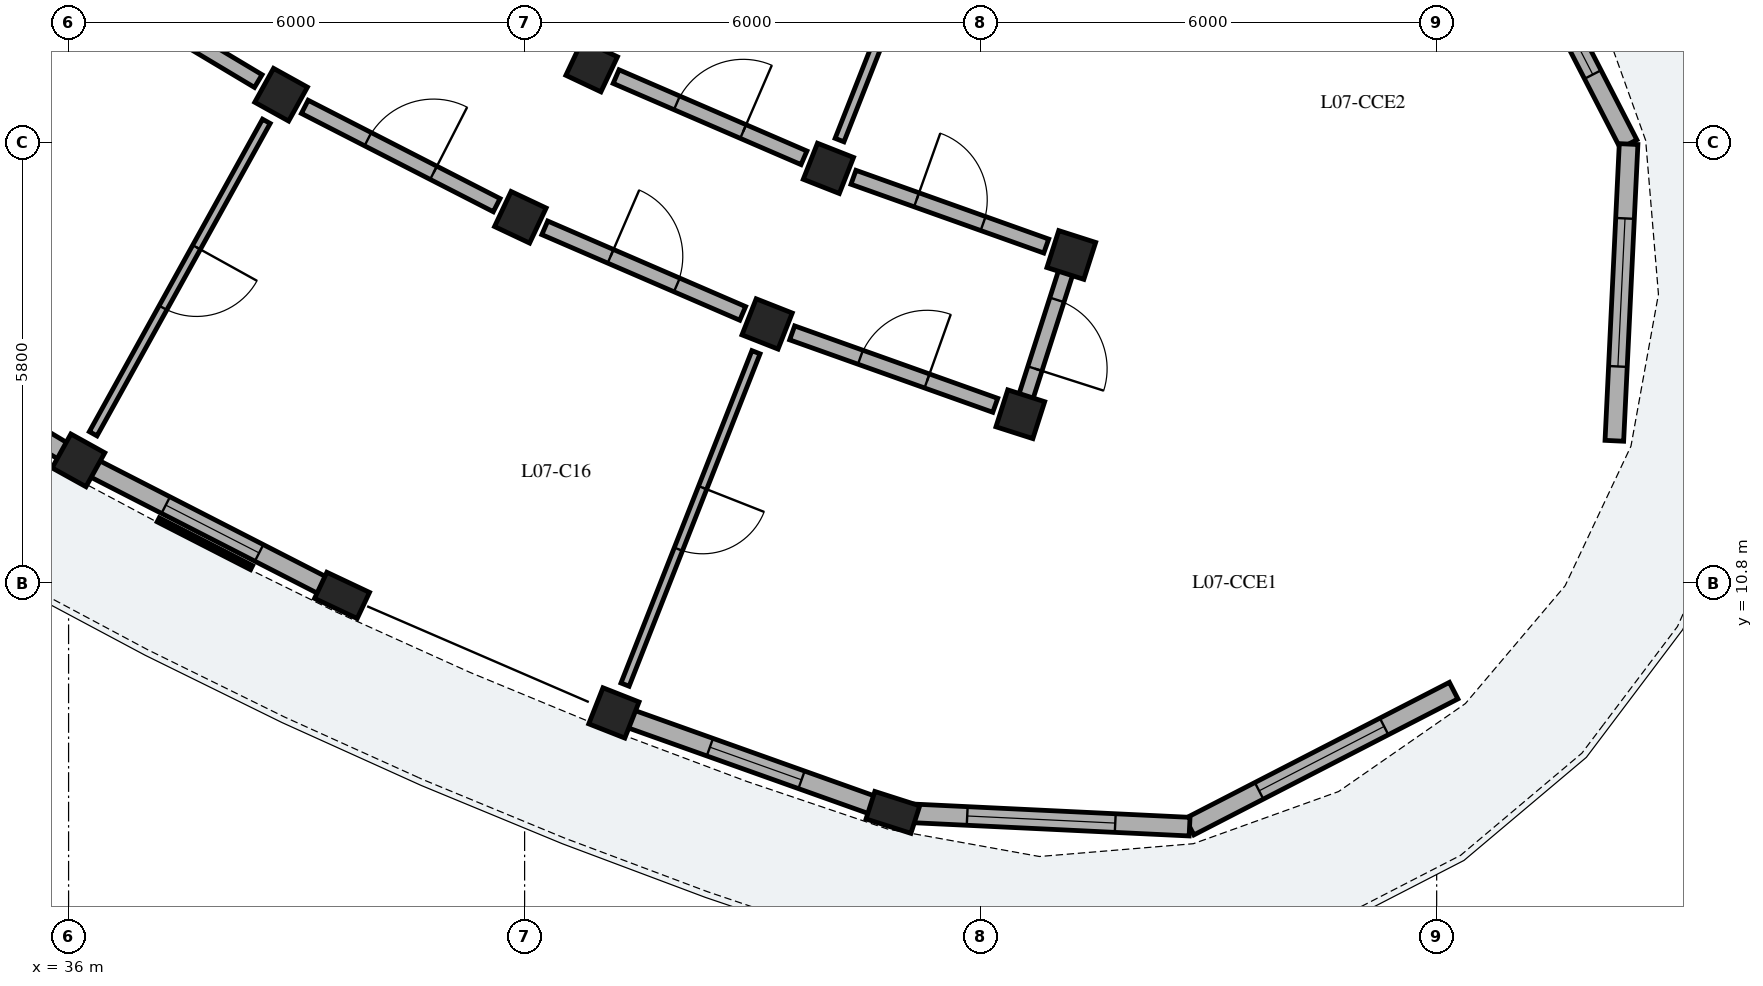
"""IFC4 building model, lengths in metres.
Left out: names, types, materials, properties, quantities, classifications, styles, units other than length and angle.
Written with IfcOpenShell. Run it as: python <this file> out.ifc"""

import sys

from ifc_helpers import new_model, si_unit, direction, frame, frame_2d, origin, origin_2d, place, context, subcontext, project, spatial, rectangle, extrude, element, fill, save


model = new_model("IFC4")
c1 = context("Model", 3, precision=1e-05, world=origin(), true_north=direction((0.0, 1.0)))
c2 = subcontext(c1, "Body", "Model", "MODEL_VIEW")
j1 = project(units=[si_unit("LENGTHUNIT", "METRE"), si_unit("PLANEANGLEUNIT", "RADIAN")], contexts=[c1])
p1 = place(None, origin())
s1 = spatial("IfcSite", under=j1, at=p1, CompositionType="ELEMENT")
p2 = place(p1, origin())
s2 = spatial("IfcBuilding", under=s1, at=p2, CompositionType="ELEMENT")
p3 = place(p2, frame((0.0, 0.0, 25.64)))
s3 = spatial("IfcBuildingStorey", under=s2, at=p3, CompositionType="ELEMENT", Elevation=25.64)
for number, where, z_axis, x_axis in (
    (1, (38.796, 17.227, 0.0), (0.0, 0.0, 1.0), (-0.485, -0.875, 0.0)),
    (2, (36.13, 12.417, 0.0), (0.0, 0.0, 1.0), (-0.485, -0.875, 0.0)),
    (3, (42.882, 17.604, 0.0), (0.0, 0.0, 1.0), (-0.427, -0.904, 0.0)),
    (4, (41.944, 15.614, 0.0), (0.0, 0.0, 1.0), (-0.427, -0.904, 0.0)),
):
    element("IfcColumn", number, at=place(p3, frame(where, z_axis=z_axis, x_axis=x_axis)), inside=s3, PredefinedType="COLUMN", context=c2, shape_type="SweptSolid", body=[
        extrude(rectangle(XDim=0.51, YDim=0.51, at=origin_2d()), origin(), (0.0, 0.0, 1.0), 3.11),
    ])
p4 = place(p3, frame((39.598, 10.64, 0.0), z_axis=(0.0, 0.0, 1.0), x_axis=(-0.426568739901, -0.904455145454, 0.0)))
e5 = element("IfcColumn", 5, at=p4, inside=s3, PredefinedType="PILASTER", context=c2, shape_type="SweptSolid", body=[
    extrude(rectangle(XDim=0.38, YDim=0.62, at=origin_2d()), origin(), (0.0, 0.0, 1.0), 3.11),
])
for number, where, z_axis, x_axis in (
    (6, (45.997, 16.258, 0.0), (0.0, 0.0, 1.0), (-0.367, -0.93, 0.0)),
    (7, (45.191, 14.211, 0.0), (0.0, 0.0, 1.0), (-0.367, -0.93, 0.0)),
    (8, (43.175, 9.094, 0.0), (0.0, 0.0, 1.0), (-0.367, -0.93, 0.0)),
    (9, (49.193, 15.118, 0.0), (0.0, 0.0, 1.0), (-0.305, -0.952, 0.0)),
    (10, (48.522, 13.023, 0.0), (0.0, 0.0, 1.0), (-0.305, -0.952, 0.0)),
):
    element("IfcColumn", number, at=place(p3, frame(where, z_axis=z_axis, x_axis=x_axis)), inside=s3, PredefinedType="COLUMN", context=c2, shape_type="SweptSolid", body=[
        extrude(rectangle(XDim=0.51, YDim=0.51, at=origin_2d()), origin(), (0.0, 0.0, 1.0), 3.11),
    ])
p5 = place(p3, frame((46.845, 7.785, 0.0), z_axis=(0.0, 0.0, 1.0), x_axis=(-0.304864299028, -0.952395799643, 0.0)))
e11 = element("IfcColumn", 11, at=p5, inside=s3, PredefinedType="PILASTER", context=c2, shape_type="SweptSolid", body=[
    extrude(rectangle(XDim=0.38, YDim=0.62, at=origin_2d()), origin(), (0.0, 0.0, 1.0), 3.11),
])
p6 = place(p3, frame((32.922, 14.334, 0.0), z_axis=(0.0, 0.0, 1.0), x_axis=(0.858277078874, -0.513186570245, 0.0)))
e12 = element("IfcWall", 12, at=p6, inside=s3, PredefinedType="SOLIDWALL", context=c2, shape_type="SweptSolid", body=[
    extrude(rectangle(XDim=3.512, YDim=0.245, at=frame_2d((1.756, 0.0))), origin(), (0.0, 0.0, 1.0), 2.355),
])
p7 = place(p6, frame((1.246, 0.0, 0.0)))
e13 = element("IfcOpeningElement", 13, at=p7, cuts=e12, PredefinedType="OPENING", context=c2, shape_type="SweptSolid", body=[
    extrude(rectangle(XDim=1.02, YDim=2.14, at=frame_2d((0.51, 1.07))), frame((0.0, 0.133, 0.0), z_axis=(0.0, -1.0, 0.0), x_axis=(1.0, 0.0, 0.0)), (0.0, 0.0, 1.0), 0.265),
])
p8 = place(p3, frame((36.33, 12.314, 0.0), z_axis=(0.0, 0.0, 1.0), x_axis=(0.890018595161, -0.455924226454, 0.0)))
e14 = element("IfcWall", 14, at=p8, inside=s3, PredefinedType="SOLIDWALL", context=c2, shape_type="SweptSolid", body=[
    extrude(rectangle(XDim=3.512, YDim=0.245, at=frame_2d((1.756, 0.0))), origin(), (0.0, 0.0, 1.0), 2.355),
])
p9 = place(p8, frame((1.066, 0.0, 0.55)))
e15 = element("IfcOpeningElement", 15, at=p9, cuts=e14, PredefinedType="OPENING", context=c2, shape_type="SweptSolid", body=[
    extrude(rectangle(XDim=1.38, YDim=1.56, at=frame_2d((0.69, 0.78))), frame((0.0, 0.133, 0.0), z_axis=(0.0, -1.0, 0.0), x_axis=(1.0, 0.0, 0.0)), (0.0, 0.0, 1.0), 0.265),
])
p10 = place(p3, frame((43.387, 9.018, 0.0), z_axis=(0.0, 0.0, 1.0), x_axis=(0.941916369274, -0.335847514943, 0.0)))
e16 = element("IfcWall", 16, at=p10, inside=s3, PredefinedType="SOLIDWALL", context=c2, shape_type="SweptSolid", body=[
    extrude(rectangle(XDim=3.512, YDim=0.245, at=frame_2d((1.756, 0.0))), origin(), (0.0, 0.0, 1.0), 2.355),
])
p11 = place(p10, frame((1.116, 0.0, 0.55)))
e17 = element("IfcOpeningElement", 17, at=p11, cuts=e16, PredefinedType="OPENING", context=c2, shape_type="SweptSolid", body=[
    extrude(rectangle(XDim=1.28, YDim=1.56, at=frame_2d((0.64, 0.78))), frame((0.0, 0.133, 0.0), z_axis=(0.0, -1.0, 0.0), x_axis=(1.0, 0.0, 0.0)), (0.0, 0.0, 1.0), 0.265),
])
p12 = place(p3, frame((54.736, 20.052, 0.0), z_axis=(0.0, 0.0, 1.0), x_axis=(0.457901236663, -0.889003069434, 0.0)))
e18 = element("IfcWall", 18, at=p12, inside=s3, PredefinedType="SOLIDWALL", context=c2, shape_type="SweptSolid", body=[
    extrude(rectangle(XDim=3.908, YDim=0.245, at=frame_2d((1.954, 0.0))), origin(), (0.0, 0.0, 1.0), 2.355),
])
p13 = place(p12, frame((1.029, 0.0, 0.4)))
e19 = element("IfcOpeningElement", 19, at=p13, cuts=e18, PredefinedType="OPENING", context=c2, shape_type="SweptSolid", body=[
    extrude(rectangle(XDim=1.85, YDim=1.72, at=frame_2d((0.925, 0.86))), frame((0.0, 0.133, 0.0), z_axis=(0.0, -1.0, 0.0), x_axis=(1.0, 0.0, 0.0)), (0.0, 0.0, 1.0), 0.265),
])
p14 = place(p3, frame((56.525, 16.577, 0.0), z_axis=(0.0, 0.0, 1.0), x_axis=(-0.047974714619, -0.998848550461, 0.0)))
e20 = element("IfcWall", 20, at=p14, inside=s3, PredefinedType="SOLIDWALL", context=c2, shape_type="SweptSolid", body=[
    extrude(rectangle(XDim=3.908, YDim=0.245, at=frame_2d((1.954, 0.0))), origin(), (0.0, 0.0, 1.0), 2.355),
])
p15 = place(p14, frame((0.979, 0.0, 0.4)))
e21 = element("IfcOpeningElement", 21, at=p15, cuts=e20, PredefinedType="OPENING", context=c2, shape_type="SweptSolid", body=[
    extrude(rectangle(XDim=1.95, YDim=1.78, at=frame_2d((0.975, 0.89))), frame((0.0, 0.133, 0.0), z_axis=(0.0, -1.0, 0.0), x_axis=(1.0, 0.0, 0.0)), (0.0, 0.0, 1.0), 0.265),
])
p16 = place(p3, frame((54.223, 9.387, 0.0), z_axis=(0.0, 0.0, 1.0), x_axis=(-0.889028498589, -0.457851863267, 0.0)))
e22 = element("IfcWall", 22, at=p16, inside=s3, PredefinedType="SOLIDWALL", context=c2, shape_type="SweptSolid", body=[
    extrude(rectangle(XDim=3.908, YDim=0.245, at=frame_2d((1.954, 0.0))), origin(), (0.0, 0.0, 1.0), 2.355),
])
p17 = place(p16, frame((1.029, 0.0, 0.4)))
e23 = element("IfcOpeningElement", 23, at=p17, cuts=e22, PredefinedType="OPENING", context=c2, shape_type="SweptSolid", body=[
    extrude(rectangle(XDim=1.85, YDim=1.72, at=frame_2d((0.925, 0.86))), frame((0.0, 0.133, 0.0), z_axis=(0.0, -1.0, 0.0), x_axis=(1.0, 0.0, 0.0)), (0.0, 0.0, 1.0), 0.265),
])
p18 = place(p3, frame((50.749, 7.597, 0.0), z_axis=(0.0, 0.0, 1.0), x_axis=(-0.998848550461, 0.047974714619, 0.0)))
e24 = element("IfcWall", 24, at=p18, inside=s3, PredefinedType="SOLIDWALL", context=c2, shape_type="SweptSolid", body=[
    extrude(rectangle(XDim=3.908, YDim=0.245, at=frame_2d((1.954, 0.0))), origin(), (0.0, 0.0, 1.0), 2.355),
])
p19 = place(p18, frame((0.979, 0.0, 0.4)))
e25 = element("IfcOpeningElement", 25, at=p19, cuts=e24, PredefinedType="OPENING", context=c2, shape_type="SweptSolid", body=[
    extrude(rectangle(XDim=1.95, YDim=1.78, at=frame_2d((0.975, 0.89))), frame((0.0, 0.133, 0.0), z_axis=(0.0, -1.0, 0.0), x_axis=(1.0, 0.0, 0.0)), (0.0, 0.0, 1.0), 0.265),
])
p20 = place(p3, frame((36.061, 18.862, 0.0), z_axis=(0.0, 0.0, 1.0), x_axis=(0.858281647443, -0.51317892948, 0.0)))
e26 = element("IfcWall", 26, at=p20, inside=s3, PredefinedType="PARTITIONING", context=c2, shape_type="SweptSolid", body=[
    extrude(rectangle(XDim=2.837, YDim=0.195, at=frame_2d((1.418, 0.0))), origin(), (0.0, 0.0, 1.0), 2.37),
])
p21 = place(p20, frame((0.924, 0.0, 0.0)))
e27 = element("IfcOpeningElement", 27, at=p21, cuts=e26, PredefinedType="OPENING", context=c2, shape_type="SweptSolid", body=[
    extrude(rectangle(XDim=0.99, YDim=2.16, at=frame_2d((0.495, 1.08))), frame((0.0, 0.107, 0.0), z_axis=(0.0, -1.0, 0.0), x_axis=(1.0, 0.0, 0.0)), (0.0, 0.0, 1.0), 0.215),
])
p22 = place(p3, frame((38.602, 16.877, 0.0), z_axis=(0.0, 0.0, 1.0), x_axis=(-0.484813534336, -0.874617537513, 0.0)))
e28 = element("IfcWall", 28, at=p22, inside=s3, PredefinedType="PARTITIONING", context=c2, shape_type="SweptSolid", body=[
    extrude(rectangle(XDim=4.7, YDim=0.115, at=frame_2d((2.35, 0.0))), origin(), (0.0, 0.0, 1.0), 2.37),
])
p23 = place(p22, frame((1.895, 0.0, 0.0)))
e29 = element("IfcOpeningElement", 29, at=p23, cuts=e28, PredefinedType="OPENING", context=c2, shape_type="SweptSolid", body=[
    extrude(rectangle(XDim=0.91, YDim=2.1, at=frame_2d((0.455, 1.05))), frame((0.0, 0.067, 0.0), z_axis=(0.0, -1.0, 0.0), x_axis=(1.0, 0.0, 0.0)), (0.0, 0.0, 1.0), 0.135),
])
p24 = place(p3, frame((39.107, 17.067, 0.0), z_axis=(0.0, 0.0, 1.0), x_axis=(0.890030590607, -0.45590080915, 0.0)))
e30 = element("IfcWall", 30, at=p24, inside=s3, PredefinedType="PARTITIONING", context=c2, shape_type="SweptSolid", body=[
    extrude(rectangle(XDim=2.837, YDim=0.195, at=frame_2d((1.418, 0.0))), origin(), (0.0, 0.0, 1.0), 2.37),
])
p25 = place(p24, frame((0.934, 0.0, 0.0)))
e31 = element("IfcOpeningElement", 31, at=p25, cuts=e30, PredefinedType="OPENING", context=c2, shape_type="SweptSolid", body=[
    extrude(rectangle(XDim=0.97, YDim=2.15, at=frame_2d((0.485, 1.075))), frame((0.0, 0.107, 0.0), z_axis=(0.0, -1.0, 0.0), x_axis=(1.0, 0.0, 0.0)), (0.0, 0.0, 1.0), 0.215),
])
p26 = place(p3, frame((42.265, 15.475, 0.0), z_axis=(0.0, 0.0, 1.0), x_axis=(0.917943439406, -0.396711282991, 0.0)))
e32 = element("IfcWall", 32, at=p26, inside=s3, PredefinedType="PARTITIONING", context=c2, shape_type="SweptSolid", body=[
    extrude(rectangle(XDim=2.837, YDim=0.195, at=frame_2d((1.418, 0.0))), origin(), (0.0, 0.0, 1.0), 2.37),
])
p27 = place(p26, frame((0.944, 0.0, 0.0)))
e33 = element("IfcOpeningElement", 33, at=p27, cuts=e32, PredefinedType="OPENING", context=c2, shape_type="SweptSolid", body=[
    extrude(rectangle(XDim=0.95, YDim=2.13, at=frame_2d((0.475, 1.065))), frame((0.0, 0.107, 0.0), z_axis=(0.0, -1.0, 0.0), x_axis=(1.0, 0.0, 0.0)), (0.0, 0.0, 1.0), 0.215),
])
p28 = place(p3, frame((43.204, 17.465, 0.0), z_axis=(0.0, 0.0, 1.0), x_axis=(0.91793557165, -0.39672948756, 0.0)))
e34 = element("IfcWall", 34, at=p28, inside=s3, PredefinedType="PARTITIONING", context=c2, shape_type="SweptSolid", body=[
    extrude(rectangle(XDim=2.693, YDim=0.195, at=frame_2d((1.346, 0.0))), origin(), (0.0, 0.0, 1.0), 2.37),
])
p29 = place(p28, frame((0.872, 0.0, 0.0)))
e35 = element("IfcOpeningElement", 35, at=p29, cuts=e34, PredefinedType="OPENING", context=c2, shape_type="SweptSolid", body=[
    extrude(rectangle(XDim=0.95, YDim=2.13, at=frame_2d((0.475, 1.065))), frame((0.0, 0.107, 0.0), z_axis=(0.0, -1.0, 0.0), x_axis=(1.0, 0.0, 0.0)), (0.0, 0.0, 1.0), 0.215),
])
p30 = place(p3, frame((45.044, 13.839, 0.0), z_axis=(0.0, 0.0, 1.0), x_axis=(-0.366468650514, -0.930430399434, 0.0)))
e36 = element("IfcWall", 36, at=p30, inside=s3, PredefinedType="PARTITIONING", context=c2, shape_type="SweptSolid", body=[
    extrude(rectangle(XDim=4.7, YDim=0.115, at=frame_2d((2.35, 0.0))), origin(), (0.0, 0.0, 1.0), 2.37),
])
p31 = place(p30, frame((1.915, 0.0, 0.0)))
e37 = element("IfcOpeningElement", 37, at=p31, cuts=e36, PredefinedType="OPENING", context=c2, shape_type="SweptSolid", body=[
    extrude(rectangle(XDim=0.87, YDim=2.08, at=frame_2d((0.435, 1.04))), frame((0.0, 0.067, 0.0), z_axis=(0.0, -1.0, 0.0), x_axis=(1.0, 0.0, 0.0)), (0.0, 0.0, 1.0), 0.135),
])
p32 = place(p3, frame((48.562, 22.771, 0.0), z_axis=(0.0, 0.0, 1.0), x_axis=(-0.366512873936, -0.930412979939, 0.0)))
e38 = element("IfcWall", 38, at=p32, inside=s3, PredefinedType="PARTITIONING", context=c2, shape_type="SweptSolid", body=[
    extrude(rectangle(XDim=6.6, YDim=0.125, at=frame_2d((3.3, 0.0))), origin(), (0.0, 0.0, 1.0), 2.37),
])
p33 = place(p32, frame((2.845, 0.0, 0.0)))
e39 = element("IfcOpeningElement", 39, at=p33, cuts=e38, PredefinedType="OPENING", context=c2, shape_type="SweptSolid", body=[
    extrude(rectangle(XDim=0.91, YDim=2.1, at=frame_2d((0.455, 1.05))), frame((0.0, 0.073, 0.0), z_axis=(0.0, -1.0, 0.0), x_axis=(1.0, 0.0, 0.0)), (0.0, 0.0, 1.0), 0.145),
])
p34 = place(p3, frame((45.52, 14.093, 0.0), z_axis=(0.0, 0.0, 1.0), x_axis=(0.941930628611, -0.335807520589, 0.0)))
e40 = element("IfcWall", 40, at=p34, inside=s3, PredefinedType="PARTITIONING", context=c2, shape_type="SweptSolid", body=[
    extrude(rectangle(XDim=2.837, YDim=0.195, at=frame_2d((1.418, 0.0))), origin(), (0.0, 0.0, 1.0), 2.37),
])
p35 = place(p34, frame((0.954, 0.0, 0.0)))
e41 = element("IfcOpeningElement", 41, at=p35, cuts=e40, PredefinedType="OPENING", context=c2, shape_type="SweptSolid", body=[
    extrude(rectangle(XDim=0.93, YDim=2.12, at=frame_2d((0.465, 1.06))), frame((0.0, 0.107, 0.0), z_axis=(0.0, -1.0, 0.0), x_axis=(1.0, 0.0, 0.0)), (0.0, 0.0, 1.0), 0.215),
])
p36 = place(p3, frame((46.327, 16.14, 0.0), z_axis=(0.0, 0.0, 1.0), x_axis=(0.941895652647, -0.335905611036, 0.0)))
e42 = element("IfcWall", 42, at=p36, inside=s3, PredefinedType="PARTITIONING", context=c2, shape_type="SweptSolid", body=[
    extrude(rectangle(XDim=2.693, YDim=0.195, at=frame_2d((1.346, 0.0))), origin(), (0.0, 0.0, 1.0), 2.37),
])
p37 = place(p36, frame((0.882, 0.0, 0.0)))
e43 = element("IfcOpeningElement", 43, at=p37, cuts=e42, PredefinedType="OPENING", context=c2, shape_type="SweptSolid", body=[
    extrude(rectangle(XDim=0.93, YDim=2.12, at=frame_2d((0.465, 1.06))), frame((0.0, 0.107, 0.0), z_axis=(0.0, -1.0, 0.0), x_axis=(1.0, 0.0, 0.0)), (0.0, 0.0, 1.0), 0.215),
])
p38 = place(p3, frame((49.177, 15.071, 0.0), z_axis=(0.0, 0.0, 1.0), x_axis=(-0.304834784779, -0.952405246725, 0.0)))
e44 = element("IfcWall", 44, at=p38, inside=s3, PredefinedType="PARTITIONING", context=c2, shape_type="SweptSolid", body=[
    extrude(rectangle(XDim=2.1, YDim=0.195, at=frame_2d((1.05, 0.0))), origin(), (0.0, 0.0, 1.0), 2.37),
])
p39 = place(p38, frame((0.57, 0.0, 0.0)))
e45 = element("IfcOpeningElement", 45, at=p39, cuts=e44, PredefinedType="OPENING", context=c2, shape_type="SweptSolid", body=[
    extrude(rectangle(XDim=0.95, YDim=2.13, at=frame_2d((0.475, 1.065))), frame((0.0, 0.107, 0.0), z_axis=(0.0, -1.0, 0.0), x_axis=(1.0, 0.0, 0.0)), (0.0, 0.0, 1.0), 0.215),
])
p40 = place(p9, origin())
e46 = element("IfcWindow", 46, at=p40, inside=s3, PartitioningType="SINGLE_PANEL", PredefinedType="WINDOW", context=c2, shape_type="SweptSolid", body=[
    extrude(rectangle(XDim=1.38, YDim=1.56, at=frame_2d((0.69, 0.78))), frame((0.0, 0.03, 0.0), z_axis=(0.0, -1.0, 0.0), x_axis=(1.0, 0.0, 0.0)), (0.0, 0.0, 1.0), 0.06),
])
fill(e15, e46)
p41 = place(p11, origin())
e47 = element("IfcWindow", 47, at=p41, inside=s3, PartitioningType="SINGLE_PANEL", PredefinedType="WINDOW", context=c2, shape_type="SweptSolid", body=[
    extrude(rectangle(XDim=1.28, YDim=1.56, at=frame_2d((0.64, 0.78))), frame((0.0, 0.03, 0.0), z_axis=(0.0, -1.0, 0.0), x_axis=(1.0, 0.0, 0.0)), (0.0, 0.0, 1.0), 0.06),
])
fill(e17, e47)
p42 = place(p13, origin())
e48 = element("IfcWindow", 48, at=p42, inside=s3, PartitioningType="SINGLE_PANEL", PredefinedType="WINDOW", context=c2, shape_type="SweptSolid", body=[
    extrude(rectangle(XDim=1.85, YDim=1.72, at=frame_2d((0.925, 0.86))), frame((0.0, 0.03, 0.0), z_axis=(0.0, -1.0, 0.0), x_axis=(1.0, 0.0, 0.0)), (0.0, 0.0, 1.0), 0.06),
])
fill(e19, e48)
p43 = place(p15, origin())
e49 = element("IfcWindow", 49, at=p43, inside=s3, PartitioningType="SINGLE_PANEL", PredefinedType="WINDOW", context=c2, shape_type="SweptSolid", body=[
    extrude(rectangle(XDim=1.95, YDim=1.78, at=frame_2d((0.975, 0.89))), frame((0.0, 0.03, 0.0), z_axis=(0.0, -1.0, 0.0), x_axis=(1.0, 0.0, 0.0)), (0.0, 0.0, 1.0), 0.06),
])
fill(e21, e49)
p44 = place(p17, origin())
e50 = element("IfcWindow", 50, at=p44, inside=s3, PartitioningType="SINGLE_PANEL", PredefinedType="WINDOW", context=c2, shape_type="SweptSolid", body=[
    extrude(rectangle(XDim=1.85, YDim=1.72, at=frame_2d((0.925, 0.86))), frame((0.0, 0.03, 0.0), z_axis=(0.0, -1.0, 0.0), x_axis=(1.0, 0.0, 0.0)), (0.0, 0.0, 1.0), 0.06),
])
fill(e23, e50)
p45 = place(p19, origin())
e51 = element("IfcWindow", 51, at=p45, inside=s3, PartitioningType="SINGLE_PANEL", PredefinedType="WINDOW", context=c2, shape_type="SweptSolid", body=[
    extrude(rectangle(XDim=1.95, YDim=1.78, at=frame_2d((0.975, 0.89))), frame((0.0, 0.03, 0.0), z_axis=(0.0, -1.0, 0.0), x_axis=(1.0, 0.0, 0.0)), (0.0, 0.0, 1.0), 0.06),
])
fill(e25, e51)
p46 = place(p23, origin())
e52 = element("IfcDoor", 52, at=p46, inside=s3, OperationType="SINGLE_SWING_LEFT", PredefinedType="DOOR", context=c2, shape_type="SweptSolid", body=[
    extrude(rectangle(XDim=0.91, YDim=2.1, at=frame_2d((0.455, 1.05))), frame((0.0, 0.025, 0.0), z_axis=(0.0, -1.0, 0.0), x_axis=(1.0, 0.0, 0.0)), (0.0, 0.0, 1.0), 0.05),
])
fill(e29, e52)
p47 = place(p25, origin())
e53 = element("IfcDoor", 53, at=p47, inside=s3, OperationType="SINGLE_SWING_RIGHT", PredefinedType="DOOR", context=c2, shape_type="SweptSolid", body=[
    extrude(rectangle(XDim=0.97, YDim=2.15, at=frame_2d((0.485, 1.075))), frame((0.0, 0.025, 0.0), z_axis=(0.0, -1.0, 0.0), x_axis=(1.0, 0.0, 0.0)), (0.0, 0.0, 1.0), 0.05),
])
fill(e31, e53)
p48 = place(p27, origin())
e54 = element("IfcDoor", 54, at=p48, inside=s3, OperationType="SINGLE_SWING_LEFT", PredefinedType="DOOR", context=c2, shape_type="SweptSolid", body=[
    extrude(rectangle(XDim=0.95, YDim=2.13, at=frame_2d((0.475, 1.065))), frame((0.0, 0.025, 0.0), z_axis=(0.0, -1.0, 0.0), x_axis=(1.0, 0.0, 0.0)), (0.0, 0.0, 1.0), 0.05),
])
fill(e33, e54)
p49 = place(p29, origin())
e55 = element("IfcDoor", 55, at=p49, inside=s3, OperationType="SINGLE_SWING_RIGHT", PredefinedType="DOOR", context=c2, shape_type="SweptSolid", body=[
    extrude(rectangle(XDim=0.95, YDim=2.13, at=frame_2d((0.475, 1.065))), frame((0.0, 0.025, 0.0), z_axis=(0.0, -1.0, 0.0), x_axis=(1.0, 0.0, 0.0)), (0.0, 0.0, 1.0), 0.05),
])
fill(e35, e55)
p50 = place(p31, origin())
e56 = element("IfcDoor", 56, at=p50, inside=s3, OperationType="SINGLE_SWING_LEFT", PredefinedType="DOOR", context=c2, shape_type="SweptSolid", body=[
    extrude(rectangle(XDim=0.87, YDim=2.08, at=frame_2d((0.435, 1.04))), frame((0.0, 0.025, 0.0), z_axis=(0.0, -1.0, 0.0), x_axis=(1.0, 0.0, 0.0)), (0.0, 0.0, 1.0), 0.05),
])
fill(e37, e56)
p51 = place(p35, origin())
e57 = element("IfcDoor", 57, at=p51, inside=s3, OperationType="SINGLE_SWING_RIGHT", PredefinedType="DOOR", context=c2, shape_type="SweptSolid", body=[
    extrude(rectangle(XDim=0.93, YDim=2.12, at=frame_2d((0.465, 1.06))), frame((0.0, 0.025, 0.0), z_axis=(0.0, -1.0, 0.0), x_axis=(1.0, 0.0, 0.0)), (0.0, 0.0, 1.0), 0.05),
])
fill(e41, e57)
p52 = place(p37, origin())
e58 = element("IfcDoor", 58, at=p52, inside=s3, OperationType="SINGLE_SWING_LEFT", PredefinedType="DOOR", context=c2, shape_type="SweptSolid", body=[
    extrude(rectangle(XDim=0.93, YDim=2.12, at=frame_2d((0.465, 1.06))), frame((0.0, 0.025, 0.0), z_axis=(0.0, -1.0, 0.0), x_axis=(1.0, 0.0, 0.0)), (0.0, 0.0, 1.0), 0.05),
])
fill(e43, e58)
p53 = place(p39, origin())
e59 = element("IfcDoor", 59, at=p53, inside=s3, OperationType="SINGLE_SWING_RIGHT", PredefinedType="DOOR", context=c2, shape_type="SweptSolid", body=[
    extrude(rectangle(XDim=0.95, YDim=2.13, at=frame_2d((0.475, 1.065))), frame((0.0, 0.025, 0.0), z_axis=(0.0, -1.0, 0.0), x_axis=(1.0, 0.0, 0.0)), (0.0, 0.0, 1.0), 0.05),
])
fill(e45, e59)
save(model, sys.argv[1])
